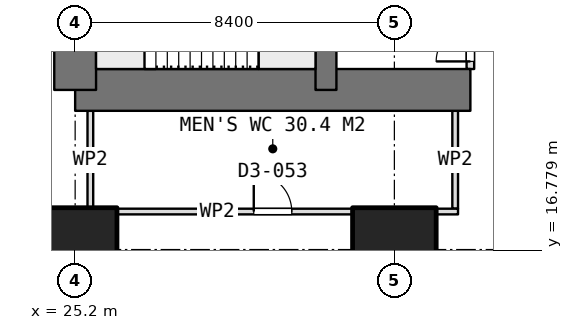
"""IFC4 building model, lengths in metres.
Left out: names, types, materials, properties, quantities, classifications, styles, units other than length and angle.
Written with IfcOpenShell. Run it as: python <this file> out.ifc"""

import sys

from ifc_helpers import new_model, si_unit, direction, frame, frame_2d, origin, origin_2d, place, context, subcontext, project, spatial, rectangle, extrude, element, fill, save


model = new_model("IFC4")
c1 = context("Model", 3, precision=1e-05, world=origin(), true_north=direction((0.0, 1.0)))
c2 = subcontext(c1, "Body", "Model", "MODEL_VIEW")
j1 = project(units=[si_unit("LENGTHUNIT", "METRE"), si_unit("PLANEANGLEUNIT", "RADIAN")], contexts=[c1])
p1 = place(None, origin())
s1 = spatial("IfcSite", under=j1, at=p1, CompositionType="ELEMENT")
p2 = place(p1, origin())
s2 = spatial("IfcBuilding", under=s1, at=p2, CompositionType="ELEMENT")
p3 = place(p2, frame((0.0, 0.0, 47.9)))
s3 = spatial("IfcBuildingStorey", under=s2, at=p3, CompositionType="ELEMENT", Elevation=47.9)
p4 = place(p3, frame((25.2, 21.0, 0.0), z_axis=(0.0, 0.0, 1.0), x_axis=(1.0, 0.0, 0.0)))
e1 = element("IfcWall", 1, at=p4, inside=s3, PredefinedType="SHEAR", context=c2, shape_type="SweptSolid", body=[
    extrude(rectangle(XDim=10.4, YDim=1.1, at=frame_2d((5.2, 0.0))), origin(), (0.0, 0.0, 1.0), 3.75),
])
p5 = place(p3, frame((25.2, 21.0, 0.0), z_axis=(0.0, 0.0, 1.0), x_axis=(0.0, 1.0, 0.0)))
e2 = element("IfcWall", 2, at=p5, inside=s3, PredefinedType="SHEAR", context=c2, shape_type="SweptSolid", body=[
    extrude(rectangle(XDim=25.2, YDim=1.1, at=frame_2d((12.6, 0.0))), origin(), (0.0, 0.0, 1.0), 3.75),
])
p6 = place(p5, frame((7.8, 0.0, 0.0)))
e3 = element("IfcOpeningElement", 3, at=p6, cuts=e2, PredefinedType="OPENING", context=c2, shape_type="SweptSolid", body=[
    extrude(rectangle(XDim=1.2, YDim=2.1, at=frame_2d((0.6, 1.05))), frame((0.0, 0.56, 0.0), z_axis=(0.0, -1.0, 0.0), x_axis=(1.0, 0.0, 0.0)), (0.0, 0.0, 1.0), 1.12),
])
p7 = place(p5, frame((14.25, 0.0, 0.0)))
e4 = element("IfcOpeningElement", 4, at=p7, cuts=e2, PredefinedType="OPENING", context=c2, shape_type="SweptSolid", body=[
    extrude(rectangle(XDim=0.9, YDim=2.1, at=frame_2d((0.45, 1.05))), frame((0.0, 0.56, 0.0), z_axis=(0.0, -1.0, 0.0), x_axis=(1.0, 0.0, 0.0)), (0.0, 0.0, 1.0), 1.12),
])
p8 = place(p5, frame((16.85, 0.0, 0.0)))
e5 = element("IfcOpeningElement", 5, at=p8, cuts=e2, PredefinedType="OPENING", context=c2, shape_type="SweptSolid", body=[
    extrude(rectangle(XDim=0.9, YDim=2.1, at=frame_2d((0.45, 1.05))), frame((0.0, 0.56, 0.0), z_axis=(0.0, -1.0, 0.0), x_axis=(1.0, 0.0, 0.0)), (0.0, 0.0, 1.0), 1.12),
])
p9 = place(p5, frame((19.075, 0.0, 0.0)))
e6 = element("IfcOpeningElement", 6, at=p9, cuts=e2, PredefinedType="OPENING", context=c2, shape_type="SweptSolid", body=[
    extrude(rectangle(XDim=1.2, YDim=2.1, at=frame_2d((0.6, 1.05))), frame((0.0, 0.56, 0.0), z_axis=(0.0, -1.0, 0.0), x_axis=(1.0, 0.0, 0.0)), (0.0, 0.0, 1.0), 1.12),
])
p10 = place(p3, frame((31.8, 21.0, 0.0), z_axis=(0.0, 0.0, 1.0), x_axis=(0.0, 1.0, 0.0)))
e7 = element("IfcWall", 7, at=p10, inside=s3, PredefinedType="SHEAR", context=c2, shape_type="SweptSolid", body=[
    extrude(rectangle(XDim=25.2, YDim=0.55, at=frame_2d((12.6, 0.0))), origin(), (0.0, 0.0, 1.0), 3.75),
])
for number, where, z_axis, x_axis in (
    (8, (25.2, 16.8, 0.0), (0.0, 0.0, 1.0), (1.0, 0.0, 0.0)),
    (9, (33.6, 16.8, 0.0), (0.0, 0.0, 1.0), (1.0, 0.0, 0.0)),
):
    element("IfcColumn", number, at=place(p3, frame(where, z_axis=z_axis, x_axis=x_axis)), inside=s3, PredefinedType="COLUMN", context=c2, shape_type="SweptSolid", body=[
        extrude(rectangle(XDim=2.2, YDim=2.2, at=origin_2d()), origin(), (0.0, 0.0, 1.0), 3.75),
    ])
p11 = place(p3, frame((35.6, 21.55, 0.0), z_axis=(0.0, 0.0, 1.0), x_axis=(0.0, 1.0, 0.0)))
e10 = element("IfcWall", 10, at=p11, inside=s3, PredefinedType="PARTITIONING", context=c2, shape_type="SweptSolid", body=[
    extrude(rectangle(XDim=1.575, YDim=0.2, at=frame_2d((0.788, 0.0))), origin(), (0.0, 0.0, 1.0), 3.5),
])
p12 = place(p11, frame((0.2, 0.0, 0.0)))
e11 = element("IfcOpeningElement", 11, at=p12, cuts=e10, PredefinedType="OPENING", context=c2, shape_type="SweptSolid", body=[
    extrude(rectangle(XDim=0.9, YDim=2.1, at=frame_2d((0.45, 1.05))), frame((0.0, 0.11, 0.0), z_axis=(0.0, -1.0, 0.0), x_axis=(1.0, 0.0, 0.0)), (0.0, 0.0, 1.0), 0.22),
])
p13 = place(p3, frame((25.525, 17.8, 0.0), z_axis=(0.0, 0.0, 1.0), x_axis=(1.0, 0.0, 0.0)))
e12 = element("IfcWall", 12, at=p13, inside=s3, PredefinedType="PARTITIONING", context=c2, shape_type="SweptSolid", body=[
    extrude(rectangle(XDim=9.75, YDim=0.15, at=frame_2d((4.875, 0.0))), origin(), (0.0, 0.0, 1.0), 3.5),
])
p14 = place(p13, frame((4.375, 0.0, 0.0)))
e13 = element("IfcOpeningElement", 13, at=p14, cuts=e12, PredefinedType="OPENING", context=c2, shape_type="SweptSolid", body=[
    extrude(rectangle(XDim=1.0, YDim=2.1, at=frame_2d((0.5, 1.05))), frame((0.0, 0.085, 0.0), z_axis=(0.0, -1.0, 0.0), x_axis=(1.0, 0.0, 0.0)), (0.0, 0.0, 1.0), 0.17),
])
for number, where, z_axis, x_axis in (
    (14, (25.6, 17.875, 0.0), (0.0, 0.0, 1.0), (0.0, 1.0, 0.0)),
    (15, (35.2, 17.875, 0.0), (0.0, 0.0, 1.0), (0.0, 1.0, 0.0)),
):
    element("IfcWall", number, at=place(p3, frame(where, z_axis=z_axis, x_axis=x_axis)), inside=s3, PredefinedType="PARTITIONING", context=c2, shape_type="SweptSolid", body=[
        extrude(rectangle(XDim=2.575, YDim=0.15, at=frame_2d((1.288, 0.0))), origin(), (0.0, 0.0, 1.0), 3.5),
    ])
p15 = place(p12, origin())
e16 = element("IfcDoor", 16, at=p15, inside=s3, OperationType="SINGLE_SWING_LEFT", PredefinedType="DOOR", context=c2, shape_type="SweptSolid", body=[
    extrude(rectangle(XDim=0.9, YDim=2.1, at=frame_2d((0.45, 1.05))), frame((0.0, 0.025, 0.0), z_axis=(0.0, -1.0, 0.0), x_axis=(1.0, 0.0, 0.0)), (0.0, 0.0, 1.0), 0.05),
])
fill(e11, e16)
p16 = place(p14, origin())
e17 = element("IfcDoor", 17, at=p16, inside=s3, OperationType="SINGLE_SWING_LEFT", PredefinedType="DOOR", context=c2, shape_type="SweptSolid", body=[
    extrude(rectangle(XDim=1.0, YDim=2.1, at=frame_2d((0.5, 1.05))), frame((0.0, 0.025, 0.0), z_axis=(0.0, -1.0, 0.0), x_axis=(1.0, 0.0, 0.0)), (0.0, 0.0, 1.0), 0.05),
])
fill(e13, e17)
save(model, sys.argv[1])
